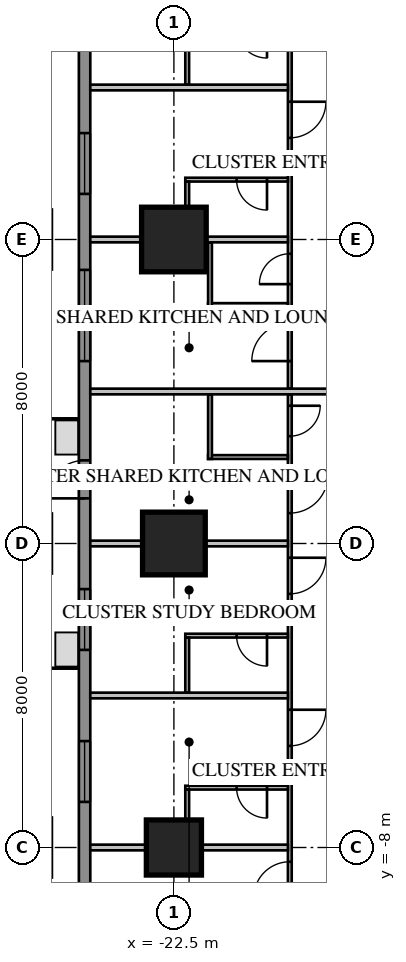
"""IFC4 building model, lengths in metres.
Left out: names, types, materials, properties, quantities, classifications, styles, units other than length and angle.
Written with IfcOpenShell. Run it as: python <this file> out.ifc"""

import sys

from ifc_helpers import new_model, si_unit, direction, frame, frame_2d, origin, origin_2d, place, context, subcontext, project, spatial, rectangle, extrude, element, fill, save


model = new_model("IFC4")
c1 = context("Model", 3, precision=1e-05, world=origin(), true_north=direction((0.0, 1.0)))
c2 = subcontext(c1, "Body", "Model", "MODEL_VIEW")
j1 = project(units=[si_unit("LENGTHUNIT", "METRE"), si_unit("PLANEANGLEUNIT", "RADIAN")], contexts=[c1])
p1 = place(None, origin())
s1 = spatial("IfcSite", under=j1, at=p1, CompositionType="ELEMENT")
p2 = place(p1, origin())
s2 = spatial("IfcBuilding", under=s1, at=p2, CompositionType="ELEMENT")
p3 = place(p2, frame((0.0, 0.0, 27.55)))
s3 = spatial("IfcBuildingStorey", under=s2, at=p3, CompositionType="ELEMENT", Elevation=27.55)
p4 = place(p3, frame((-22.5, 8.0, 0.0), z_axis=(0.0, 0.0, 1.0), x_axis=(1.0, 0.0, 0.0)))
e1 = element("IfcColumn", 1, at=p4, inside=s3, PredefinedType="COLUMN", context=c2, shape_type="SweptSolid", body=[
    extrude(rectangle(XDim=1.7, YDim=1.7, at=origin_2d()), origin(), (0.0, 0.0, 1.0), 3.85),
])
p5 = place(p3, frame((-22.5, 0.0, 0.0), z_axis=(0.0, 0.0, 1.0), x_axis=(1.0, 0.0, 0.0)))
e2 = element("IfcColumn", 2, at=p5, inside=s3, PredefinedType="COLUMN", context=c2, shape_type="SweptSolid", body=[
    extrude(rectangle(XDim=1.65, YDim=1.65, at=origin_2d()), origin(), (0.0, 0.0, 1.0), 3.85),
])
p6 = place(p3, frame((-22.5, -8.0, 0.0), z_axis=(0.0, 0.0, 1.0), x_axis=(1.0, 0.0, 0.0)))
e3 = element("IfcColumn", 3, at=p6, inside=s3, PredefinedType="COLUMN", context=c2, shape_type="SweptSolid", body=[
    extrude(rectangle(XDim=1.45, YDim=1.45, at=origin_2d()), origin(), (0.0, 0.0, 1.0), 3.85),
])
p7 = place(p3, frame((-24.85, 16.0, 0.0), z_axis=(0.0, 0.0, 1.0), x_axis=(0.0, -1.0, 0.0)))
e4 = element("IfcWall", 4, at=p7, inside=s3, PredefinedType="SOLIDWALL", context=c2, shape_type="SweptSolid", body=[
    extrude(rectangle(XDim=32.0, YDim=0.3, at=frame_2d((16.0, 0.0))), origin(), (0.0, 0.0, 1.0), 3.65),
])
p8 = place(p7, frame((1.2, 0.0, 0.75)))
e5 = element("IfcOpeningElement", 5, at=p8, cuts=e4, PredefinedType="OPENING", context=c2, shape_type="SweptSolid", body=[
    extrude(rectangle(XDim=1.6, YDim=1.8, at=frame_2d((0.8, 0.9))), frame((0.0, 0.17, 0.0), z_axis=(0.0, -1.0, 0.0), x_axis=(1.0, 0.0, 0.0)), (0.0, 0.0, 1.0), 0.34),
])
p9 = place(p7, frame((5.2, 0.0, 0.75)))
e6 = element("IfcOpeningElement", 6, at=p9, cuts=e4, PredefinedType="OPENING", context=c2, shape_type="SweptSolid", body=[
    extrude(rectangle(XDim=1.6, YDim=1.8, at=frame_2d((0.8, 0.9))), frame((0.0, 0.17, 0.0), z_axis=(0.0, -1.0, 0.0), x_axis=(1.0, 0.0, 0.0)), (0.0, 0.0, 1.0), 0.34),
])
p10 = place(p7, frame((17.2, 0.0, 0.75)))
e7 = element("IfcOpeningElement", 7, at=p10, cuts=e4, PredefinedType="OPENING", context=c2, shape_type="SweptSolid", body=[
    extrude(rectangle(XDim=1.6, YDim=1.8, at=frame_2d((0.8, 0.9))), frame((0.0, 0.17, 0.0), z_axis=(0.0, -1.0, 0.0), x_axis=(1.0, 0.0, 0.0)), (0.0, 0.0, 1.0), 0.34),
])
p11 = place(p7, frame((21.2, 0.0, 0.75)))
e8 = element("IfcOpeningElement", 8, at=p11, cuts=e4, PredefinedType="OPENING", context=c2, shape_type="SweptSolid", body=[
    extrude(rectangle(XDim=1.6, YDim=1.8, at=frame_2d((0.8, 0.9))), frame((0.0, 0.17, 0.0), z_axis=(0.0, -1.0, 0.0), x_axis=(1.0, 0.0, 0.0)), (0.0, 0.0, 1.0), 0.34),
])
p12 = place(p7, frame((25.2, 0.0, 0.75)))
e9 = element("IfcOpeningElement", 9, at=p12, cuts=e4, PredefinedType="OPENING", context=c2, shape_type="SweptSolid", body=[
    extrude(rectangle(XDim=1.6, YDim=1.8, at=frame_2d((0.8, 0.9))), frame((0.0, 0.17, 0.0), z_axis=(0.0, -1.0, 0.0), x_axis=(1.0, 0.0, 0.0)), (0.0, 0.0, 1.0), 0.34),
])
p13 = place(p7, frame((29.2, 0.0, 0.75)))
e10 = element("IfcOpeningElement", 10, at=p13, cuts=e4, PredefinedType="OPENING", context=c2, shape_type="SweptSolid", body=[
    extrude(rectangle(XDim=1.6, YDim=1.8, at=frame_2d((0.8, 0.9))), frame((0.0, 0.17, 0.0), z_axis=(0.0, -1.0, 0.0), x_axis=(1.0, 0.0, 0.0)), (0.0, 0.0, 1.0), 0.34),
])
p14 = place(p7, frame((8.8, 0.0, 0.75)))
e11 = element("IfcOpeningElement", 11, at=p14, cuts=e4, PredefinedType="OPENING", context=c2, shape_type="SweptSolid", body=[
    extrude(rectangle(XDim=2.4, YDim=1.8, at=frame_2d((1.2, 0.9))), frame((0.0, 0.17, 0.0), z_axis=(0.0, -1.0, 0.0), x_axis=(1.0, 0.0, 0.0)), (0.0, 0.0, 1.0), 0.34),
])
p15 = place(p7, frame((13.812, 0.0, 0.0)))
e12 = element("IfcOpeningElement", 12, at=p15, cuts=e4, PredefinedType="OPENING", context=c2, shape_type="SweptSolid", body=[
    extrude(rectangle(XDim=1.0, YDim=2.4, at=frame_2d((0.5, 1.2))), frame((0.0, 0.17, 0.0), z_axis=(0.0, -1.0, 0.0), x_axis=(1.0, 0.0, 0.0)), (0.0, 0.0, 1.0), 0.34),
])
p16 = place(p3, frame((-19.45, 15.925, 0.0), z_axis=(0.0, 0.0, 1.0), x_axis=(0.0, -1.0, 0.0)))
e13 = element("IfcWall", 13, at=p16, inside=s3, PredefinedType="PARTITIONING", context=c2, shape_type="SweptSolid", body=[
    extrude(rectangle(XDim=11.85, YDim=0.1, at=frame_2d((5.925, 0.0))), origin(), (0.0, 0.0, 1.0), 3.65),
])
p17 = place(p16, frame((10.125, 0.0, 0.0)))
e14 = element("IfcOpeningElement", 14, at=p17, cuts=e13, PredefinedType="OPENING", context=c2, shape_type="SweptSolid", body=[
    extrude(rectangle(XDim=1.0, YDim=2.1, at=frame_2d((0.5, 1.05))), frame((0.0, 0.07, 0.0), z_axis=(0.0, -1.0, 0.0), x_axis=(1.0, 0.0, 0.0)), (0.0, 0.0, 1.0), 0.14),
])
p18 = place(p16, frame((8.3, 0.0, 0.0)))
e15 = element("IfcOpeningElement", 15, at=p18, cuts=e13, PredefinedType="OPENING", context=c2, shape_type="SweptSolid", body=[
    extrude(rectangle(XDim=0.8, YDim=2.1, at=frame_2d((0.4, 1.05))), frame((0.0, 0.07, 0.0), z_axis=(0.0, -1.0, 0.0), x_axis=(1.0, 0.0, 0.0)), (0.0, 0.0, 1.0), 0.14),
])
p19 = place(p16, frame((0.3, 0.0, 0.0)))
e16 = element("IfcOpeningElement", 16, at=p19, cuts=e13, PredefinedType="OPENING", context=c2, shape_type="SweptSolid", body=[
    extrude(rectangle(XDim=0.95, YDim=2.1, at=frame_2d((0.475, 1.05))), frame((0.0, 0.07, 0.0), z_axis=(0.0, -1.0, 0.0), x_axis=(1.0, 0.0, 0.0)), (0.0, 0.0, 1.0), 0.14),
])
p20 = place(p16, frame((4.3, 0.0, 0.0)))
e17 = element("IfcOpeningElement", 17, at=p20, cuts=e13, PredefinedType="OPENING", context=c2, shape_type="SweptSolid", body=[
    extrude(rectangle(XDim=0.95, YDim=2.1, at=frame_2d((0.475, 1.05))), frame((0.0, 0.07, 0.0), z_axis=(0.0, -1.0, 0.0), x_axis=(1.0, 0.0, 0.0)), (0.0, 0.0, 1.0), 0.14),
])
p21 = place(p3, frame((-19.5, 6.275, 0.0), z_axis=(0.0, 0.0, 1.0), x_axis=(-1.0, 0.0, 0.0)))
e18 = element("IfcWall", 18, at=p21, inside=s3, PredefinedType="PARTITIONING", context=c2, shape_type="SweptSolid", body=[
    extrude(rectangle(XDim=2.1, YDim=0.1, at=frame_2d((1.05, 0.0))), origin(), (0.0, 0.0, 1.0), 3.65),
])
p22 = place(p3, frame((-21.55, 7.925, 0.0), z_axis=(0.0, 0.0, 1.0), x_axis=(0.0, -1.0, 0.0)))
e19 = element("IfcWall", 19, at=p22, inside=s3, PredefinedType="PARTITIONING", context=c2, shape_type="SweptSolid", body=[
    extrude(rectangle(XDim=1.7, YDim=0.1, at=frame_2d((0.85, 0.0))), origin(), (0.0, 0.0, 1.0), 3.65),
])
p23 = place(p3, frame((-19.45, 3.925, 0.0), z_axis=(0.0, 0.0, 1.0), x_axis=(0.0, -1.0, 0.0)))
e20 = element("IfcWall", 20, at=p23, inside=s3, PredefinedType="PARTITIONING", context=c2, shape_type="SweptSolid", body=[
    extrude(rectangle(XDim=19.85, YDim=0.1, at=frame_2d((9.925, 0.0))), origin(), (0.0, 0.0, 1.0), 3.65),
])
p24 = place(p23, frame((2.125, 0.0, 0.0)))
e21 = element("IfcOpeningElement", 21, at=p24, cuts=e20, PredefinedType="OPENING", context=c2, shape_type="SweptSolid", body=[
    extrude(rectangle(XDim=1.0, YDim=2.1, at=frame_2d((0.5, 1.05))), frame((0.0, 0.07, 0.0), z_axis=(0.0, -1.0, 0.0), x_axis=(1.0, 0.0, 0.0)), (0.0, 0.0, 1.0), 0.14),
])
p25 = place(p23, frame((0.3, 0.0, 0.0)))
e22 = element("IfcOpeningElement", 22, at=p25, cuts=e20, PredefinedType="OPENING", context=c2, shape_type="SweptSolid", body=[
    extrude(rectangle(XDim=0.8, YDim=2.1, at=frame_2d((0.4, 1.05))), frame((0.0, 0.07, 0.0), z_axis=(0.0, -1.0, 0.0), x_axis=(1.0, 0.0, 0.0)), (0.0, 0.0, 1.0), 0.14),
])
p26 = place(p23, frame((4.3, 0.0, 0.0)))
e23 = element("IfcOpeningElement", 23, at=p26, cuts=e20, PredefinedType="OPENING", context=c2, shape_type="SweptSolid", body=[
    extrude(rectangle(XDim=0.95, YDim=2.1, at=frame_2d((0.475, 1.05))), frame((0.0, 0.07, 0.0), z_axis=(0.0, -1.0, 0.0), x_axis=(1.0, 0.0, 0.0)), (0.0, 0.0, 1.0), 0.14),
])
p27 = place(p23, frame((8.3, 0.0, 0.0)))
e24 = element("IfcOpeningElement", 24, at=p27, cuts=e20, PredefinedType="OPENING", context=c2, shape_type="SweptSolid", body=[
    extrude(rectangle(XDim=0.95, YDim=2.1, at=frame_2d((0.475, 1.05))), frame((0.0, 0.07, 0.0), z_axis=(0.0, -1.0, 0.0), x_axis=(1.0, 0.0, 0.0)), (0.0, 0.0, 1.0), 0.14),
])
p28 = place(p23, frame((12.3, 0.0, 0.0)))
e25 = element("IfcOpeningElement", 25, at=p28, cuts=e20, PredefinedType="OPENING", context=c2, shape_type="SweptSolid", body=[
    extrude(rectangle(XDim=0.95, YDim=2.1, at=frame_2d((0.475, 1.05))), frame((0.0, 0.07, 0.0), z_axis=(0.0, -1.0, 0.0), x_axis=(1.0, 0.0, 0.0)), (0.0, 0.0, 1.0), 0.14),
])
p29 = place(p23, frame((16.3, 0.0, 0.0)))
e26 = element("IfcOpeningElement", 26, at=p29, cuts=e20, PredefinedType="OPENING", context=c2, shape_type="SweptSolid", body=[
    extrude(rectangle(XDim=0.95, YDim=2.1, at=frame_2d((0.475, 1.05))), frame((0.0, 0.07, 0.0), z_axis=(0.0, -1.0, 0.0), x_axis=(1.0, 0.0, 0.0)), (0.0, 0.0, 1.0), 0.14),
])
p30 = place(p3, frame((-19.5, 2.275, 0.0), z_axis=(0.0, 0.0, 1.0), x_axis=(-1.0, 0.0, 0.0)))
e27 = element("IfcWall", 27, at=p30, inside=s3, PredefinedType="PARTITIONING", context=c2, shape_type="SweptSolid", body=[
    extrude(rectangle(XDim=2.1, YDim=0.1, at=frame_2d((1.05, 0.0))), origin(), (0.0, 0.0, 1.0), 3.65),
])
p31 = place(p3, frame((-21.55, 3.925, 0.0), z_axis=(0.0, 0.0, 1.0), x_axis=(0.0, -1.0, 0.0)))
e28 = element("IfcWall", 28, at=p31, inside=s3, PredefinedType="PARTITIONING", context=c2, shape_type="SweptSolid", body=[
    extrude(rectangle(XDim=1.7, YDim=0.1, at=frame_2d((0.85, 0.0))), origin(), (0.0, 0.0, 1.0), 3.65),
])
for number, where, z_axis, x_axis in (
    (29, (-19.5, 12.0, 0.0), (0.0, 0.0, 1.0), (-1.0, 0.0, 0.0)),
    (30, (-19.5, 8.0, 0.0), (0.0, 0.0, 1.0), (-1.0, 0.0, 0.0)),
):
    element("IfcWall", number, at=place(p3, frame(where, z_axis=z_axis, x_axis=x_axis)), inside=s3, PredefinedType="PARTITIONING", context=c2, shape_type="SweptSolid", body=[
        extrude(rectangle(XDim=5.2, YDim=0.15, at=frame_2d((2.6, 0.0))), origin(), (0.0, 0.0, 1.0), 3.65),
    ])
p32 = place(p3, frame((-18.1, 4.0, 0.0), z_axis=(0.0, 0.0, 1.0), x_axis=(-1.0, 0.0, 0.0)))
e31 = element("IfcWall", 31, at=p32, inside=s3, PredefinedType="PARTITIONING", context=c2, shape_type="SweptSolid", body=[
    extrude(rectangle(XDim=6.6, YDim=0.15, at=frame_2d((3.3, 0.0))), origin(), (0.0, 0.0, 1.0), 3.65),
])
p33 = place(p3, frame((-19.5, 0.0, 0.0), z_axis=(0.0, 0.0, 1.0), x_axis=(-1.0, 0.0, 0.0)))
e32 = element("IfcWall", 32, at=p33, inside=s3, PredefinedType="PARTITIONING", context=c2, shape_type="SweptSolid", body=[
    extrude(rectangle(XDim=5.2, YDim=0.15, at=frame_2d((2.6, 0.0))), origin(), (0.0, 0.0, 1.0), 2.957),
])
for number, where, z_axis, x_axis in (
    (33, (-19.5, -4.0, 0.0), (0.0, 0.0, 1.0), (-1.0, 0.0, 0.0)),
    (34, (-19.5, -8.0, 0.0), (0.0, 0.0, 1.0), (-1.0, 0.0, 0.0)),
):
    element("IfcWall", number, at=place(p3, frame(where, z_axis=z_axis, x_axis=x_axis)), inside=s3, PredefinedType="PARTITIONING", context=c2, shape_type="SweptSolid", body=[
        extrude(rectangle(XDim=5.2, YDim=0.15, at=frame_2d((2.6, 0.0))), origin(), (0.0, 0.0, 1.0), 3.65),
    ])
p34 = place(p3, frame((-22.15, 13.525, 0.0), z_axis=(0.0, 0.0, 1.0), x_axis=(0.0, -1.0, 0.0)))
e35 = element("IfcWall", 35, at=p34, inside=s3, PredefinedType="PARTITIONING", context=c2, shape_type="SweptSolid", body=[
    extrude(rectangle(XDim=1.45, YDim=0.1, at=frame_2d((0.725, 0.0))), origin(), (0.0, 0.0, 1.0), 3.65),
])
p35 = place(p3, frame((-19.5, 9.575, 0.0), z_axis=(0.0, 0.0, 1.0), x_axis=(-1.0, 0.0, 0.0)))
e36 = element("IfcWall", 36, at=p35, inside=s3, PredefinedType="PARTITIONING", context=c2, shape_type="SweptSolid", body=[
    extrude(rectangle(XDim=2.7, YDim=0.1, at=frame_2d((1.35, 0.0))), origin(), (0.0, 0.0, 1.0), 3.65),
])
p36 = place(p35, frame((0.55, 0.0, 0.0)))
e37 = element("IfcOpeningElement", 37, at=p36, cuts=e36, PredefinedType="OPENING", context=c2, shape_type="SweptSolid", body=[
    extrude(rectangle(XDim=0.8, YDim=2.1, at=frame_2d((0.4, 1.05))), frame((0.0, 0.07, 0.0), z_axis=(0.0, -1.0, 0.0), x_axis=(1.0, 0.0, 0.0)), (0.0, 0.0, 1.0), 0.14),
])
p37 = place(p3, frame((-22.15, 9.525, 0.0), z_axis=(0.0, 0.0, 1.0), x_axis=(0.0, -1.0, 0.0)))
e38 = element("IfcWall", 38, at=p37, inside=s3, PredefinedType="PARTITIONING", context=c2, shape_type="SweptSolid", body=[
    extrude(rectangle(XDim=1.45, YDim=0.1, at=frame_2d((0.725, 0.0))), origin(), (0.0, 0.0, 1.0), 3.65),
])
p38 = place(p3, frame((-19.5, -2.425, 0.0), z_axis=(0.0, 0.0, 1.0), x_axis=(-1.0, 0.0, 0.0)))
e39 = element("IfcWall", 39, at=p38, inside=s3, PredefinedType="PARTITIONING", context=c2, shape_type="SweptSolid", body=[
    extrude(rectangle(XDim=2.7, YDim=0.1, at=frame_2d((1.35, 0.0))), origin(), (0.0, 0.0, 1.0), 3.65),
])
p39 = place(p38, frame((0.55, 0.0, 0.0)))
e40 = element("IfcOpeningElement", 40, at=p39, cuts=e39, PredefinedType="OPENING", context=c2, shape_type="SweptSolid", body=[
    extrude(rectangle(XDim=0.8, YDim=2.1, at=frame_2d((0.4, 1.05))), frame((0.0, 0.07, 0.0), z_axis=(0.0, -1.0, 0.0), x_axis=(1.0, 0.0, 0.0)), (0.0, 0.0, 1.0), 0.14),
])
p40 = place(p3, frame((-22.15, -2.475, 0.0), z_axis=(0.0, 0.0, 1.0), x_axis=(0.0, -1.0, 0.0)))
e41 = element("IfcWall", 41, at=p40, inside=s3, PredefinedType="PARTITIONING", context=c2, shape_type="SweptSolid", body=[
    extrude(rectangle(XDim=1.45, YDim=0.1, at=frame_2d((0.725, 0.0))), origin(), (0.0, 0.0, 1.0), 3.65),
])
p41 = place(p3, frame((-19.5, -6.425, 0.0), z_axis=(0.0, 0.0, 1.0), x_axis=(-1.0, 0.0, 0.0)))
e42 = element("IfcWall", 42, at=p41, inside=s3, PredefinedType="PARTITIONING", context=c2, shape_type="SweptSolid", body=[
    extrude(rectangle(XDim=2.7, YDim=0.1, at=frame_2d((1.35, 0.0))), origin(), (0.0, 0.0, 1.0), 3.65),
])
p42 = place(p41, frame((0.55, 0.0, 0.0)))
e43 = element("IfcOpeningElement", 43, at=p42, cuts=e42, PredefinedType="OPENING", context=c2, shape_type="SweptSolid", body=[
    extrude(rectangle(XDim=0.8, YDim=2.1, at=frame_2d((0.4, 1.05))), frame((0.0, 0.07, 0.0), z_axis=(0.0, -1.0, 0.0), x_axis=(1.0, 0.0, 0.0)), (0.0, 0.0, 1.0), 0.14),
])
p43 = place(p3, frame((-22.15, -6.475, 0.0), z_axis=(0.0, 0.0, 1.0), x_axis=(0.0, -1.0, 0.0)))
e44 = element("IfcWall", 44, at=p43, inside=s3, PredefinedType="PARTITIONING", context=c2, shape_type="SweptSolid", body=[
    extrude(rectangle(XDim=1.45, YDim=0.1, at=frame_2d((0.725, 0.0))), origin(), (0.0, 0.0, 1.0), 3.65),
])
p44 = place(p9, origin())
e45 = element("IfcWindow", 45, at=p44, inside=s3, PartitioningType="SINGLE_PANEL", PredefinedType="WINDOW", context=c2, shape_type="SweptSolid", body=[
    extrude(rectangle(XDim=1.6, YDim=1.8, at=frame_2d((0.8, 0.9))), frame((0.0, 0.03, 0.0), z_axis=(0.0, -1.0, 0.0), x_axis=(1.0, 0.0, 0.0)), (0.0, 0.0, 1.0), 0.06),
])
fill(e6, e45)
p45 = place(p10, origin())
e46 = element("IfcWindow", 46, at=p45, inside=s3, PartitioningType="SINGLE_PANEL", PredefinedType="WINDOW", context=c2, shape_type="SweptSolid", body=[
    extrude(rectangle(XDim=1.6, YDim=1.8, at=frame_2d((0.8, 0.9))), frame((0.0, 0.03, 0.0), z_axis=(0.0, -1.0, 0.0), x_axis=(1.0, 0.0, 0.0)), (0.0, 0.0, 1.0), 0.06),
])
fill(e7, e46)
p46 = place(p11, origin())
e47 = element("IfcWindow", 47, at=p46, inside=s3, PartitioningType="SINGLE_PANEL", PredefinedType="WINDOW", context=c2, shape_type="SweptSolid", body=[
    extrude(rectangle(XDim=1.6, YDim=1.8, at=frame_2d((0.8, 0.9))), frame((0.0, 0.03, 0.0), z_axis=(0.0, -1.0, 0.0), x_axis=(1.0, 0.0, 0.0)), (0.0, 0.0, 1.0), 0.06),
])
fill(e8, e47)
p47 = place(p14, origin())
e48 = element("IfcWindow", 48, at=p47, inside=s3, PartitioningType="SINGLE_PANEL", PredefinedType="WINDOW", context=c2, shape_type="SweptSolid", body=[
    extrude(rectangle(XDim=2.4, YDim=1.8, at=frame_2d((1.2, 0.9))), frame((0.0, 0.03, 0.0), z_axis=(0.0, -1.0, 0.0), x_axis=(1.0, 0.0, 0.0)), (0.0, 0.0, 1.0), 0.06),
])
fill(e11, e48)
p48 = place(p15, origin())
e49 = element("IfcDoor", 49, at=p48, inside=s3, OperationType="SINGLE_SWING_RIGHT", PredefinedType="DOOR", context=c2, shape_type="SweptSolid", body=[
    extrude(rectangle(XDim=1.0, YDim=2.4, at=frame_2d((0.5, 1.2))), frame((0.0, 0.025, 0.0), z_axis=(0.0, -1.0, 0.0), x_axis=(1.0, 0.0, 0.0)), (0.0, 0.0, 1.0), 0.05),
])
fill(e12, e49)
p49 = place(p17, origin())
e50 = element("IfcDoor", 50, at=p49, inside=s3, OperationType="SINGLE_SWING_RIGHT", PredefinedType="DOOR", context=c2, shape_type="SweptSolid", body=[
    extrude(rectangle(XDim=1.0, YDim=2.1, at=frame_2d((0.5, 1.05))), frame((0.0, 0.025, 0.0), z_axis=(0.0, -1.0, 0.0), x_axis=(1.0, 0.0, 0.0)), (0.0, 0.0, 1.0), 0.05),
])
fill(e14, e50)
p50 = place(p18, origin())
e51 = element("IfcDoor", 51, at=p50, inside=s3, OperationType="SINGLE_SWING_RIGHT", PredefinedType="DOOR", context=c2, shape_type="SweptSolid", body=[
    extrude(rectangle(XDim=0.8, YDim=2.1, at=frame_2d((0.4, 1.05))), frame((0.0, 0.025, 0.0), z_axis=(0.0, -1.0, 0.0), x_axis=(1.0, 0.0, 0.0)), (0.0, 0.0, 1.0), 0.05),
])
fill(e15, e51)
p51 = place(p24, origin())
e52 = element("IfcDoor", 52, at=p51, inside=s3, OperationType="SINGLE_SWING_LEFT", PredefinedType="DOOR", context=c2, shape_type="SweptSolid", body=[
    extrude(rectangle(XDim=1.0, YDim=2.1, at=frame_2d((0.5, 1.05))), frame((0.0, 0.025, 0.0), z_axis=(0.0, -1.0, 0.0), x_axis=(1.0, 0.0, 0.0)), (0.0, 0.0, 1.0), 0.05),
])
fill(e21, e52)
p52 = place(p25, origin())
e53 = element("IfcDoor", 53, at=p52, inside=s3, OperationType="SINGLE_SWING_LEFT", PredefinedType="DOOR", context=c2, shape_type="SweptSolid", body=[
    extrude(rectangle(XDim=0.8, YDim=2.1, at=frame_2d((0.4, 1.05))), frame((0.0, 0.025, 0.0), z_axis=(0.0, -1.0, 0.0), x_axis=(1.0, 0.0, 0.0)), (0.0, 0.0, 1.0), 0.05),
])
fill(e22, e53)
p53 = place(p20, origin())
e54 = element("IfcDoor", 54, at=p53, inside=s3, OperationType="SINGLE_SWING_LEFT", PredefinedType="DOOR", context=c2, shape_type="SweptSolid", body=[
    extrude(rectangle(XDim=0.95, YDim=2.1, at=frame_2d((0.475, 1.05))), frame((0.0, 0.025, 0.0), z_axis=(0.0, -1.0, 0.0), x_axis=(1.0, 0.0, 0.0)), (0.0, 0.0, 1.0), 0.05),
])
fill(e17, e54)
p54 = place(p36, origin())
e55 = element("IfcDoor", 55, at=p54, inside=s3, OperationType="SINGLE_SWING_LEFT", PredefinedType="DOOR", context=c2, shape_type="SweptSolid", body=[
    extrude(rectangle(XDim=0.8, YDim=2.1, at=frame_2d((0.4, 1.05))), frame((0.0, 0.025, 0.0), z_axis=(0.0, -1.0, 0.0), x_axis=(1.0, 0.0, 0.0)), (0.0, 0.0, 1.0), 0.05),
])
fill(e37, e55)
p55 = place(p26, origin())
e56 = element("IfcDoor", 56, at=p55, inside=s3, OperationType="SINGLE_SWING_LEFT", PredefinedType="DOOR", context=c2, shape_type="SweptSolid", body=[
    extrude(rectangle(XDim=0.95, YDim=2.1, at=frame_2d((0.475, 1.05))), frame((0.0, 0.025, 0.0), z_axis=(0.0, -1.0, 0.0), x_axis=(1.0, 0.0, 0.0)), (0.0, 0.0, 1.0), 0.05),
])
fill(e23, e56)
p56 = place(p39, origin())
e57 = element("IfcDoor", 57, at=p56, inside=s3, OperationType="SINGLE_SWING_LEFT", PredefinedType="DOOR", context=c2, shape_type="SweptSolid", body=[
    extrude(rectangle(XDim=0.8, YDim=2.1, at=frame_2d((0.4, 1.05))), frame((0.0, 0.025, 0.0), z_axis=(0.0, -1.0, 0.0), x_axis=(1.0, 0.0, 0.0)), (0.0, 0.0, 1.0), 0.05),
])
fill(e40, e57)
p57 = place(p27, origin())
e58 = element("IfcDoor", 58, at=p57, inside=s3, OperationType="SINGLE_SWING_LEFT", PredefinedType="DOOR", context=c2, shape_type="SweptSolid", body=[
    extrude(rectangle(XDim=0.95, YDim=2.1, at=frame_2d((0.475, 1.05))), frame((0.0, 0.025, 0.0), z_axis=(0.0, -1.0, 0.0), x_axis=(1.0, 0.0, 0.0)), (0.0, 0.0, 1.0), 0.05),
])
fill(e24, e58)
p58 = place(p42, origin())
e59 = element("IfcDoor", 59, at=p58, inside=s3, OperationType="SINGLE_SWING_LEFT", PredefinedType="DOOR", context=c2, shape_type="SweptSolid", body=[
    extrude(rectangle(XDim=0.8, YDim=2.1, at=frame_2d((0.4, 1.05))), frame((0.0, 0.025, 0.0), z_axis=(0.0, -1.0, 0.0), x_axis=(1.0, 0.0, 0.0)), (0.0, 0.0, 1.0), 0.05),
])
fill(e43, e59)
p59 = place(p28, origin())
e60 = element("IfcDoor", 60, at=p59, inside=s3, OperationType="SINGLE_SWING_RIGHT", PredefinedType="DOOR", context=c2, shape_type="SweptSolid", body=[
    extrude(rectangle(XDim=0.95, YDim=2.1, at=frame_2d((0.475, 1.05))), frame((0.0, 0.025, 0.0), z_axis=(0.0, -1.0, 0.0), x_axis=(1.0, 0.0, 0.0)), (0.0, 0.0, 1.0), 0.05),
])
fill(e25, e60)
save(model, sys.argv[1])
